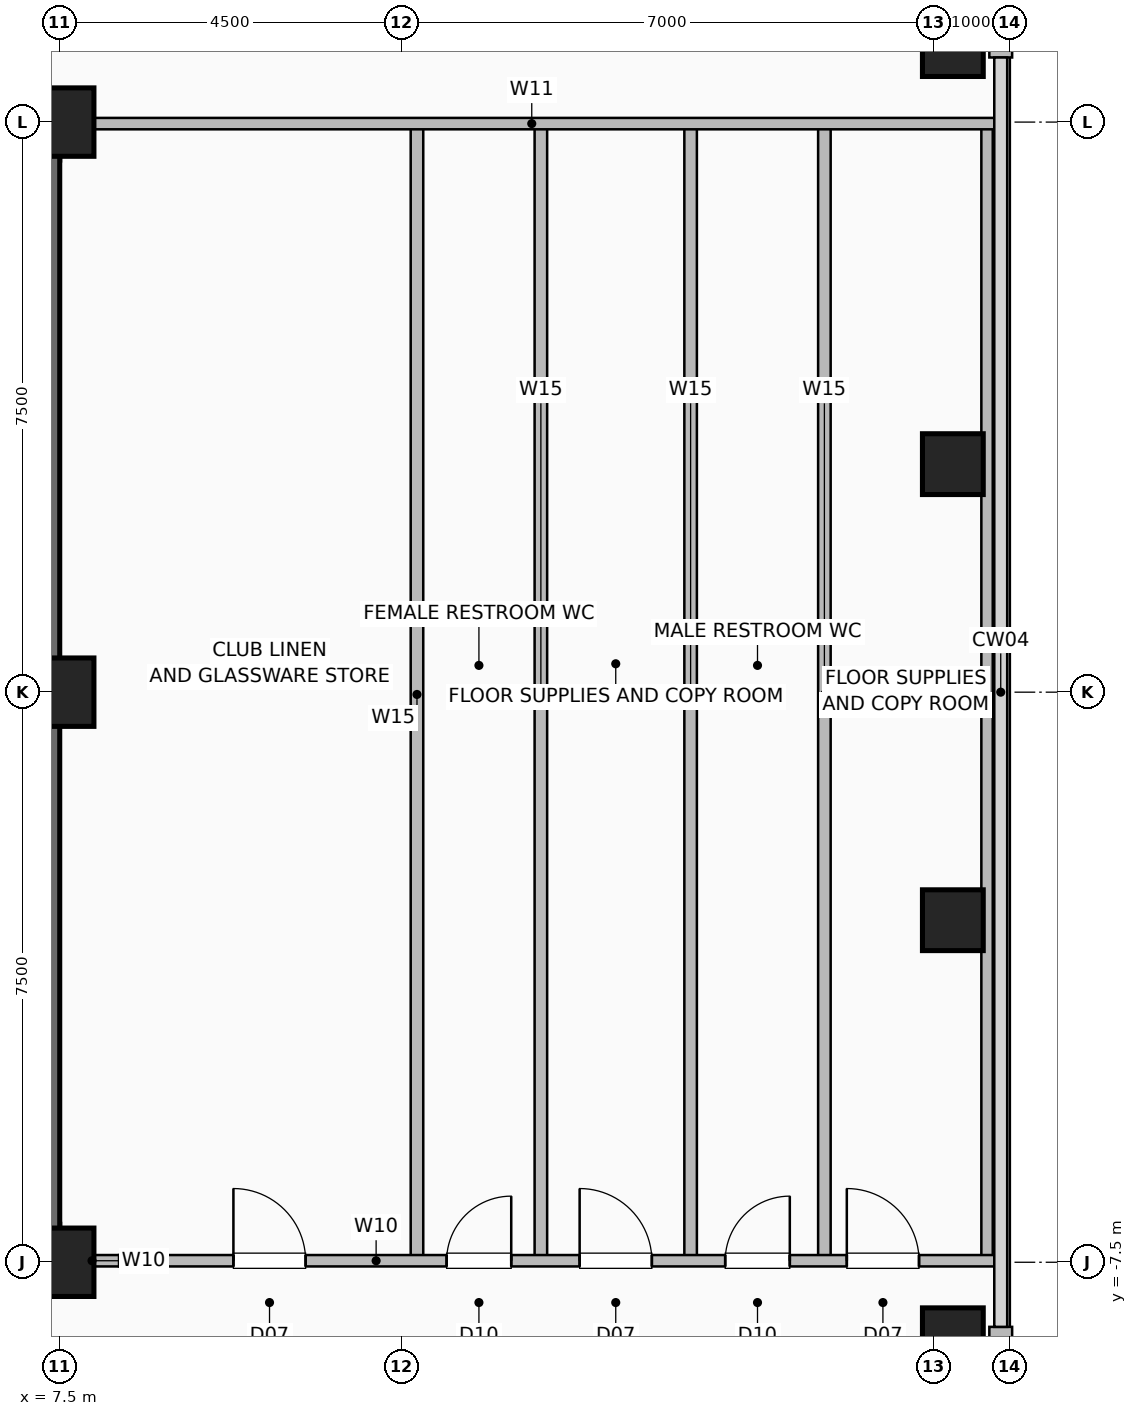
"""IFC4 building model, lengths in metres.
Left out: names, types, materials, properties, quantities, classifications, styles, units other than length and angle.
Written with IfcOpenShell. Run it as: python <this file> out.ifc"""

import sys

from ifc_helpers import new_model, si_unit, direction, frame, frame_2d, origin, origin_2d, place, context, subcontext, project, spatial, rectangle, hollow_rectangle, extrude, element, fill, save


model = new_model("IFC4")
c1 = context("Model", 3, precision=1e-05, world=origin(), true_north=direction((0.0, 1.0)))
c2 = subcontext(c1, "Body", "Model", "MODEL_VIEW")
j1 = project(units=[si_unit("LENGTHUNIT", "METRE"), si_unit("PLANEANGLEUNIT", "RADIAN")], contexts=[c1])
p1 = place(None, origin())
s1 = spatial("IfcSite", under=j1, at=p1, CompositionType="ELEMENT")
p2 = place(p1, origin())
s2 = spatial("IfcBuilding", under=s1, at=p2, CompositionType="ELEMENT")
p3 = place(p2, frame((0.0, 0.0, 191.4)))
s3 = spatial("IfcBuildingStorey", under=s2, at=p3, CompositionType="ELEMENT", Elevation=191.4)
for number, where, z_axis, x_axis in (
    (1, (7.5, -7.5, 0.0), (0.0, 0.0, 1.0), (1.0, 0.0, 0.0)),
    (2, (7.5, 0.0, 0.0), (0.0, 0.0, 1.0), (1.0, 0.0, 0.0)),
    (3, (7.5, 7.5, 0.0), (0.0, 0.0, 1.0), (1.0, 0.0, 0.0)),
):
    element("IfcColumn", number, at=place(p3, frame(where, z_axis=z_axis, x_axis=x_axis)), inside=s3, PredefinedType="COLUMN", context=c2, shape_type="SweptSolid", body=[
        extrude(hollow_rectangle(XDim=0.9, YDim=0.9, WallThickness=0.045, at=origin_2d()), origin(), (0.0, 0.0, 1.0), 3.6),
    ])
for number, where, z_axis, x_axis in (
    (4, (19.25, -8.5, 0.0), (0.0, 0.0, 1.0), (1.0, 0.0, 0.0)),
    (5, (19.25, -3.0, 0.0), (0.0, 0.0, 1.0), (1.0, 0.0, 0.0)),
    (6, (19.25, 3.0, 0.0), (0.0, 0.0, 1.0), (1.0, 0.0, 0.0)),
    (7, (19.25, 8.5, 0.0), (0.0, 0.0, 1.0), (1.0, 0.0, 0.0)),
):
    element("IfcColumn", number, at=place(p3, frame(where, z_axis=z_axis, x_axis=x_axis)), inside=s3, PredefinedType="COLUMN", context=c2, shape_type="SweptSolid", body=[
        extrude(hollow_rectangle(XDim=0.8, YDim=0.8, WallThickness=0.04, at=origin_2d()), origin(), (0.0, 0.0, 1.0), 3.6),
    ])
for number, where, z_axis, x_axis in (
    (8, (19.88, -13.15, 0.0), (0.0, 0.0, 1.0), (0.0, 1.0, 0.0)),
    (9, (19.88, 8.35, 0.0), (0.0, 0.0, 1.0), (0.0, 1.0, 0.0)),
):
    element("IfcWall", number, at=place(p3, frame(where, z_axis=z_axis, x_axis=x_axis)), inside=s3, PredefinedType="SOLIDWALL", context=c2, shape_type="SweptSolid", body=[
        extrude(rectangle(XDim=4.8, YDim=0.3, at=frame_2d((2.4, 0.0))), origin(), (0.0, 0.0, 1.0), 3.36),
    ])
p4 = place(p3, frame((-7.5, -7.25, 0.0), z_axis=(0.0, 0.0, 1.0), x_axis=(1.0, 0.0, 0.0)))
e10 = element("IfcWall", 10, at=p4, inside=s3, PredefinedType="SHEAR", context=c2, shape_type="SweptSolid", body=[
    extrude(rectangle(XDim=15.0, YDim=0.5, at=frame_2d((7.5, 0.0))), origin(), (0.0, 0.0, 1.0), 3.36),
])
p5 = place(p4, frame((1.55, 0.0, 0.0)))
e11 = element("IfcOpeningElement", 11, at=p5, cuts=e10, PredefinedType="OPENING", context=c2, shape_type="SweptSolid", body=[
    extrude(rectangle(XDim=1.05, YDim=2.08, at=frame_2d((0.525, 1.04))), frame((0.0, 0.26, 0.0), z_axis=(0.0, -1.0, 0.0), x_axis=(1.0, 0.0, 0.0)), (0.0, 0.0, 1.0), 0.52),
])
p6 = place(p4, frame((12.4, 0.0, 0.0)))
e12 = element("IfcOpeningElement", 12, at=p6, cuts=e10, PredefinedType="OPENING", context=c2, shape_type="SweptSolid", body=[
    extrude(rectangle(XDim=1.05, YDim=2.08, at=frame_2d((0.525, 1.04))), frame((0.0, 0.26, 0.0), z_axis=(0.0, -1.0, 0.0), x_axis=(1.0, 0.0, 0.0)), (0.0, 0.0, 1.0), 0.52),
])
p7 = place(p4, frame((4.95, 0.0, 0.0)))
e13 = element("IfcOpeningElement", 13, at=p7, cuts=e10, PredefinedType="OPENING", context=c2, shape_type="SweptSolid", body=[
    extrude(rectangle(XDim=1.0, YDim=2.08, at=frame_2d((0.5, 1.04))), frame((0.0, 0.26, 0.0), z_axis=(0.0, -1.0, 0.0), x_axis=(1.0, 0.0, 0.0)), (0.0, 0.0, 1.0), 0.52),
])
p8 = place(p4, frame((7.05, 0.0, 0.0)))
e14 = element("IfcOpeningElement", 14, at=p8, cuts=e10, PredefinedType="OPENING", context=c2, shape_type="SweptSolid", body=[
    extrude(rectangle(XDim=1.0, YDim=2.08, at=frame_2d((0.5, 1.04))), frame((0.0, 0.26, 0.0), z_axis=(0.0, -1.0, 0.0), x_axis=(1.0, 0.0, 0.0)), (0.0, 0.0, 1.0), 0.52),
])
p9 = place(p4, frame((9.15, 0.0, 0.0)))
e15 = element("IfcOpeningElement", 15, at=p9, cuts=e10, PredefinedType="OPENING", context=c2, shape_type="SweptSolid", body=[
    extrude(rectangle(XDim=1.0, YDim=2.08, at=frame_2d((0.5, 1.04))), frame((0.0, 0.26, 0.0), z_axis=(0.0, -1.0, 0.0), x_axis=(1.0, 0.0, 0.0)), (0.0, 0.0, 1.0), 0.52),
])
for number, where, z_axis, x_axis in (
    (16, (-7.5, 7.25, 0.0), (0.0, 0.0, 1.0), (1.0, 0.0, 0.0)),
    (17, (7.25, -7.5, 0.0), (0.0, 0.0, 1.0), (0.0, 1.0, 0.0)),
):
    element("IfcWall", number, at=place(p3, frame(where, z_axis=z_axis, x_axis=x_axis)), inside=s3, PredefinedType="SHEAR", context=c2, shape_type="SweptSolid", body=[
        extrude(rectangle(XDim=15.0, YDim=0.5, at=frame_2d((7.5, 0.0))), origin(), (0.0, 0.0, 1.0), 3.36),
    ])
p10 = place(p3, frame((7.45, -7.48, 0.0), z_axis=(0.0, 0.0, 1.0), x_axis=(1.0, 0.0, 0.0)))
e18 = element("IfcWall", 18, at=p10, inside=s3, PredefinedType="PARTITIONING", context=c2, shape_type="SweptSolid", body=[
    extrude(rectangle(XDim=0.95, YDim=0.15, at=frame_2d((0.475, 0.0))), origin(), (0.0, 0.0, 1.0), 3.36),
])
for number, where, z_axis, x_axis in (
    (19, (13.83, -7.48, 0.0), (0.0, 0.0, 1.0), (0.0, 1.0, 0.0)),
    (20, (17.56, -7.48, 0.0), (0.0, 0.0, 1.0), (0.0, 1.0, 0.0)),
    (21, (12.2, -7.48, 0.0), (0.0, 0.0, 1.0), (0.0, 1.0, 0.0)),
    (22, (15.8, -7.48, 0.0), (0.0, 0.0, 1.0), (0.0, 1.0, 0.0)),
):
    element("IfcWall", number, at=place(p3, frame(where, z_axis=z_axis, x_axis=x_axis)), inside=s3, PredefinedType="PLUMBINGWALL", context=c2, shape_type="SweptSolid", body=[
        extrude(rectangle(XDim=14.9, YDim=0.165, at=frame_2d((7.45, 0.0))), origin(), (0.0, 0.0, 1.0), 3.36),
    ])
p11 = place(p3, frame((19.7, -7.48, 0.0), z_axis=(0.0, 0.0, 1.0), x_axis=(0.0, 1.0, 0.0)))
e23 = element("IfcWall", 23, at=p11, inside=s3, PredefinedType="PARTITIONING", context=c2, shape_type="SweptSolid", body=[
    extrude(rectangle(XDim=14.9, YDim=0.15, at=frame_2d((7.45, 0.0))), origin(), (0.0, 0.0, 1.0), 3.36),
])
p12 = place(p3, frame((8.28, -7.48, 0.0), z_axis=(0.0, 0.0, 1.0), x_axis=(1.0, 0.0, 0.0)))
e24 = element("IfcWall", 24, at=p12, inside=s3, PredefinedType="PARTITIONING", context=c2, shape_type="SweptSolid", body=[
    extrude(rectangle(XDim=11.54, YDim=0.15, at=frame_2d((5.77, 0.0))), origin(), (0.0, 0.0, 1.0), 3.36),
])
p13 = place(p12, frame((1.505, 0.0, 0.0)))
e25 = element("IfcOpeningElement", 25, at=p13, cuts=e24, PredefinedType="OPENING", context=c2, shape_type="SweptSolid", body=[
    extrude(rectangle(XDim=0.95, YDim=2.06, at=frame_2d((0.475, 1.03))), frame((0.0, 0.085, 0.0), z_axis=(0.0, -1.0, 0.0), x_axis=(1.0, 0.0, 0.0)), (0.0, 0.0, 1.0), 0.17),
])
p14 = place(p12, frame((4.31, 0.0, 0.0)))
e26 = element("IfcOpeningElement", 26, at=p14, cuts=e24, PredefinedType="OPENING", context=c2, shape_type="SweptSolid", body=[
    extrude(rectangle(XDim=0.85, YDim=2.05, at=frame_2d((0.425, 1.025))), frame((0.0, 0.085, 0.0), z_axis=(0.0, -1.0, 0.0), x_axis=(1.0, 0.0, 0.0)), (0.0, 0.0, 1.0), 0.17),
])
p15 = place(p12, frame((6.06, 0.0, 0.0)))
e27 = element("IfcOpeningElement", 27, at=p15, cuts=e24, PredefinedType="OPENING", context=c2, shape_type="SweptSolid", body=[
    extrude(rectangle(XDim=0.95, YDim=2.06, at=frame_2d((0.475, 1.03))), frame((0.0, 0.085, 0.0), z_axis=(0.0, -1.0, 0.0), x_axis=(1.0, 0.0, 0.0)), (0.0, 0.0, 1.0), 0.17),
])
p16 = place(p12, frame((7.975, 0.0, 0.0)))
e28 = element("IfcOpeningElement", 28, at=p16, cuts=e24, PredefinedType="OPENING", context=c2, shape_type="SweptSolid", body=[
    extrude(rectangle(XDim=0.85, YDim=2.05, at=frame_2d((0.425, 1.025))), frame((0.0, 0.085, 0.0), z_axis=(0.0, -1.0, 0.0), x_axis=(1.0, 0.0, 0.0)), (0.0, 0.0, 1.0), 0.17),
])
p17 = place(p12, frame((9.575, 0.0, 0.0)))
e29 = element("IfcOpeningElement", 29, at=p17, cuts=e24, PredefinedType="OPENING", context=c2, shape_type="SweptSolid", body=[
    extrude(rectangle(XDim=0.95, YDim=2.06, at=frame_2d((0.475, 1.03))), frame((0.0, 0.085, 0.0), z_axis=(0.0, -1.0, 0.0), x_axis=(1.0, 0.0, 0.0)), (0.0, 0.0, 1.0), 0.17),
])
p18 = place(p3, frame((7.6, 7.48, 0.0), z_axis=(0.0, 0.0, 1.0), x_axis=(1.0, 0.0, 0.0)))
e30 = element("IfcWall", 30, at=p18, inside=s3, PredefinedType="PARTITIONING", context=c2, shape_type="SweptSolid", body=[
    extrude(rectangle(XDim=12.22, YDim=0.15, at=frame_2d((6.11, 0.0))), origin(), (0.0, 0.0, 1.0), 3.36),
])
p19 = place(p13, origin())
e31 = element("IfcDoor", 31, at=p19, inside=s3, OperationType="SINGLE_SWING_LEFT", PredefinedType="DOOR", context=c2, shape_type="SweptSolid", body=[
    extrude(rectangle(XDim=0.95, YDim=2.06, at=frame_2d((0.475, 1.03))), frame((0.0, 0.025, 0.0), z_axis=(0.0, -1.0, 0.0), x_axis=(1.0, 0.0, 0.0)), (0.0, 0.0, 1.0), 0.05),
])
fill(e25, e31)
p20 = place(p14, origin())
e32 = element("IfcDoor", 32, at=p20, inside=s3, OperationType="SINGLE_SWING_RIGHT", PredefinedType="DOOR", context=c2, shape_type="SweptSolid", body=[
    extrude(rectangle(XDim=0.85, YDim=2.05, at=frame_2d((0.425, 1.025))), frame((0.0, 0.025, 0.0), z_axis=(0.0, -1.0, 0.0), x_axis=(1.0, 0.0, 0.0)), (0.0, 0.0, 1.0), 0.05),
])
fill(e26, e32)
p21 = place(p15, origin())
e33 = element("IfcDoor", 33, at=p21, inside=s3, OperationType="SINGLE_SWING_LEFT", PredefinedType="DOOR", context=c2, shape_type="SweptSolid", body=[
    extrude(rectangle(XDim=0.95, YDim=2.06, at=frame_2d((0.475, 1.03))), frame((0.0, 0.025, 0.0), z_axis=(0.0, -1.0, 0.0), x_axis=(1.0, 0.0, 0.0)), (0.0, 0.0, 1.0), 0.05),
])
fill(e27, e33)
p22 = place(p16, origin())
e34 = element("IfcDoor", 34, at=p22, inside=s3, OperationType="SINGLE_SWING_RIGHT", PredefinedType="DOOR", context=c2, shape_type="SweptSolid", body=[
    extrude(rectangle(XDim=0.85, YDim=2.05, at=frame_2d((0.425, 1.025))), frame((0.0, 0.025, 0.0), z_axis=(0.0, -1.0, 0.0), x_axis=(1.0, 0.0, 0.0)), (0.0, 0.0, 1.0), 0.05),
])
fill(e28, e34)
p23 = place(p17, origin())
e35 = element("IfcDoor", 35, at=p23, inside=s3, OperationType="SINGLE_SWING_LEFT", PredefinedType="DOOR", context=c2, shape_type="SweptSolid", body=[
    extrude(rectangle(XDim=0.95, YDim=2.06, at=frame_2d((0.475, 1.03))), frame((0.0, 0.025, 0.0), z_axis=(0.0, -1.0, 0.0), x_axis=(1.0, 0.0, 0.0)), (0.0, 0.0, 1.0), 0.05),
])
fill(e29, e35)
save(model, sys.argv[1])
